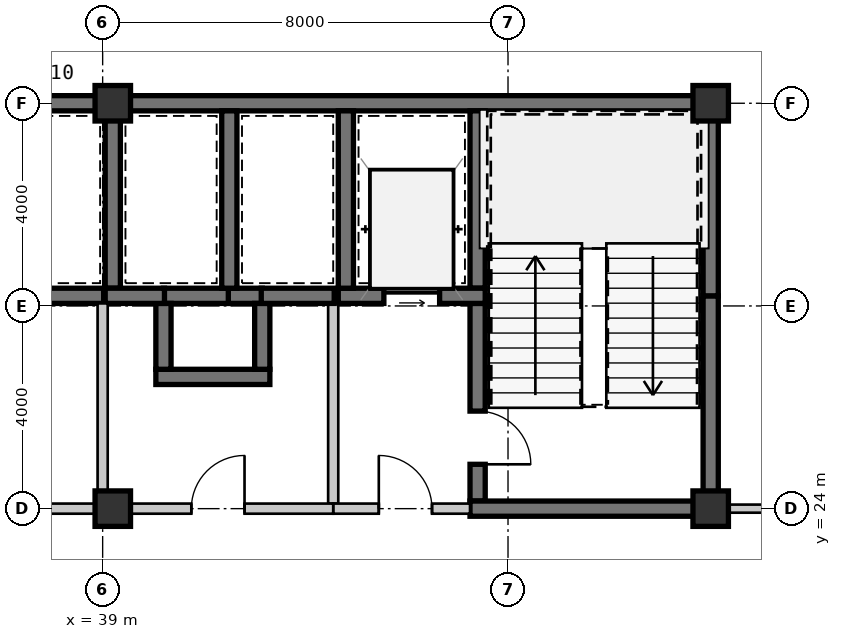
"""IFC4 building model, lengths in metres.
Left out: names, types, materials, properties, quantities, classifications, styles, units other than length and angle.
Written with IfcOpenShell. Run it as: python <this file> out.ifc"""

import sys

from ifc_helpers import new_model, si_unit, direction, frame, frame_2d, origin, origin_2d, place, context, subcontext, project, spatial, rectangle, extrude, source, transform, mapped, element, fill, save


model = new_model("IFC4")
c1 = context("Model", 3, precision=1e-05, world=origin(), true_north=direction((0.0, 1.0)))
c2 = subcontext(c1, "Body", "Model", "MODEL_VIEW")
j1 = project(units=[si_unit("LENGTHUNIT", "METRE"), si_unit("PLANEANGLEUNIT", "RADIAN")], contexts=[c1])
p1 = place(None, origin())
s1 = spatial("IfcSite", under=j1, at=p1, CompositionType="ELEMENT")
p2 = place(p1, origin())
s2 = spatial("IfcBuilding", under=s1, at=p2, CompositionType="ELEMENT")
p3 = place(p2, frame((0.0, 0.0, 93.45)))
s3 = spatial("IfcBuildingStorey", under=s2, at=p3, CompositionType="ELEMENT", Elevation=93.45)
m1 = source(origin(), c2, "Body", "SweptSolid", [
    extrude(rectangle(XDim=0.7, YDim=0.7, at=origin_2d()), origin(), (0.0, 0.0, 1.0), 3.15),
])
for number, where, z_axis, x_axis in (
    (1, (39.2, 24.0, 0.0), (0.0, 0.0, 1.0), (1.0, 0.0, 0.0)),
    (2, (51.0, 24.0, 0.0), (0.0, 0.0, 1.0), (1.0, 0.0, 0.0)),
    (3, (39.2, 32.0, 0.0), (0.0, 0.0, 1.0), (1.0, 0.0, 0.0)),
    (4, (51.0, 32.0, 0.0), (0.0, 0.0, 1.0), (1.0, 0.0, 0.0)),
):
    element("IfcColumn", number, at=place(p3, frame(where, z_axis=z_axis, x_axis=x_axis)), inside=s3, PredefinedType="COLUMN", context=c2, shape_type="MappedRepresentation", body=[
        mapped(m1, transform((0.0, 0.0, 0.0), scale=1.0)),
    ])
m2 = source(origin(), c2, "Body", "SweptSolid", [
    extrude(rectangle(XDim=11.2, YDim=0.3, at=frame_2d((5.6, 0.0))), origin(), (0.0, 0.0, 1.0), 2.93),
])
p4 = place(p3, frame((28.0, 32.0, 0.0), z_axis=(0.0, 0.0, 1.0), x_axis=(1.0, 0.0, 0.0)))
e5 = element("IfcWall", 5, at=p4, inside=s3, PredefinedType="SHEAR", context=c2, shape_type="MappedRepresentation", body=[
    mapped(m2, transform((0.0, 0.0, 0.0), scale=1.0)),
])
m3 = source(origin(), c2, "Body", "SweptSolid", [
    extrude(rectangle(XDim=11.95, YDim=0.3, at=frame_2d((5.975, 0.0))), origin(), (0.0, 0.0, 1.0), 2.93),
])
p5 = place(p3, frame((39.2, 32.0, 0.0), z_axis=(0.0, 0.0, 1.0), x_axis=(1.0, 0.0, 0.0)))
e6 = element("IfcWall", 6, at=p5, inside=s3, PredefinedType="SHEAR", context=c2, shape_type="MappedRepresentation", body=[
    mapped(m3, transform((0.0, 0.0, 0.0), scale=1.0)),
])
m4 = source(origin(), c2, "Body", "SweptSolid", [
    extrude(rectangle(XDim=4.05, YDim=0.3, at=frame_2d((2.025, 0.0))), origin(), (0.0, 0.0, 1.0), 2.93),
])
p6 = place(p3, frame((51.0, 24.15, 0.0), z_axis=(0.0, 0.0, 1.0), x_axis=(0.0, 1.0, 0.0)))
e7 = element("IfcWall", 7, at=p6, inside=s3, PredefinedType="SHEAR", context=c2, shape_type="MappedRepresentation", body=[
    mapped(m4, transform((0.0, 0.0, 0.0), scale=1.0)),
])
m5 = source(origin(), c2, "Body", "SweptSolid", [
    extrude(rectangle(XDim=3.65, YDim=0.3, at=frame_2d((1.825, 0.0))), origin(), (0.0, 0.0, 1.0), 2.93),
])
p7 = place(p3, frame((51.0, 28.2, 0.0), z_axis=(0.0, 0.0, 1.0), x_axis=(0.0, 1.0, 0.0)))
e8 = element("IfcWall", 8, at=p7, inside=s3, PredefinedType="SHEAR", context=c2, shape_type="MappedRepresentation", body=[
    mapped(m5, transform((0.0, 0.0, 0.0), scale=1.0)),
])
m6 = source(origin(), c2, "Body", "SweptSolid", [
    extrude(rectangle(XDim=3.5, YDim=0.3, at=frame_2d((1.75, 0.0))), origin(), (0.0, 0.0, 1.0), 2.93),
])
p8 = place(p3, frame((46.4, 31.85, 0.0), z_axis=(0.0, 0.0, 1.0), x_axis=(0.0, -1.0, 0.0)))
e9 = element("IfcWall", 9, at=p8, inside=s3, PredefinedType="SHEAR", context=c2, shape_type="MappedRepresentation", body=[
    mapped(m6, transform((0.0, 0.0, 0.0), scale=1.0)),
])
m7 = source(origin(), c2, "Body", "SweptSolid", [
    extrude(rectangle(XDim=3.9, YDim=0.3, at=frame_2d((1.95, 0.0))), origin(), (0.0, 0.0, 1.0), 2.93),
])
p9 = place(p3, frame((46.4, 28.05, 0.0), z_axis=(0.0, 0.0, 1.0), x_axis=(0.0, -1.0, 0.0)))
e10 = element("IfcWall", 10, at=p9, inside=s3, PredefinedType="SHEAR", context=c2, shape_type="MappedRepresentation", body=[
    mapped(m7, transform((0.0, 0.0, 0.0), scale=1.0)),
])
m8 = source(origin(), c2, "Body", "SweptSolid", [
    extrude(rectangle(XDim=1.05, YDim=2.1, at=frame_2d((0.525, 1.05))), frame((0.0, 0.16, 0.0), z_axis=(0.0, -1.0, 0.0), x_axis=(1.0, 0.0, 0.0)), (0.0, 0.0, 1.0), 0.32),
])
p10 = place(p9, frame((2.125, 0.0, 0.0)))
e11 = element("IfcOpeningElement", 11, at=p10, cuts=e10, PredefinedType="OPENING", context=c2, shape_type="MappedRepresentation", body=[
    mapped(m8, transform((0.0, 0.0, 0.0), scale=1.0)),
])
m9 = source(origin(), c2, "Body", "SweptSolid", [
    extrude(rectangle(XDim=4.9, YDim=0.3, at=frame_2d((2.45, 0.0))), origin(), (0.0, 0.0, 1.0), 2.93),
])
p11 = place(p3, frame((46.25, 24.0, 0.0), z_axis=(0.0, 0.0, 1.0), x_axis=(1.0, 0.0, 0.0)))
e12 = element("IfcWall", 12, at=p11, inside=s3, PredefinedType="SHEAR", context=c2, shape_type="MappedRepresentation", body=[
    mapped(m9, transform((0.0, 0.0, 0.0), scale=1.0)),
])
m10 = source(origin(), c2, "Body", "SweptSolid", [
    extrude(rectangle(XDim=2.9, YDim=0.3, at=frame_2d((1.45, 0.0))), origin(), (0.0, 0.0, 1.0), 2.93),
])
p12 = place(p3, frame((43.65, 28.2, 0.0), z_axis=(0.0, 0.0, 1.0), x_axis=(1.0, 0.0, 0.0)))
e13 = element("IfcWall", 13, at=p12, inside=s3, PredefinedType="SHEAR", context=c2, shape_type="MappedRepresentation", body=[
    mapped(m10, transform((0.0, 0.0, 0.0), scale=1.0)),
])
m11 = source(origin(), c2, "Body", "SweptSolid", [
    extrude(rectangle(XDim=1.1, YDim=2.15, at=frame_2d((0.55, 1.075))), frame((0.0, 0.16, 0.0), z_axis=(0.0, -1.0, 0.0), x_axis=(1.0, 0.0, 0.0)), (0.0, 0.0, 1.0), 0.32),
])
p13 = place(p12, frame((0.9, 0.0, 0.0)))
e14 = element("IfcOpeningElement", 14, at=p13, cuts=e13, PredefinedType="OPENING", context=c2, shape_type="MappedRepresentation", body=[
    mapped(m11, transform((0.0, 0.0, 0.0), scale=1.0)),
])
p14 = place(p3, frame((43.8, 31.85, 0.0), z_axis=(0.0, 0.0, 1.0), x_axis=(0.0, -1.0, 0.0)))
e15 = element("IfcWall", 15, at=p14, inside=s3, PredefinedType="SHEAR", context=c2, shape_type="MappedRepresentation", body=[
    mapped(m6, transform((0.0, 0.0, 0.0), scale=1.0)),
])
m12 = source(origin(), c2, "Body", "SweptSolid", [
    extrude(rectangle(XDim=3.95, YDim=0.2, at=frame_2d((1.975, 0.0))), origin(), (0.0, 0.0, 1.0), 2.93),
])
p15 = place(p3, frame((43.55, 28.05, 0.0), z_axis=(0.0, 0.0, 1.0), x_axis=(0.0, -1.0, 0.0)))
e16 = element("IfcWall", 16, at=p15, inside=s3, PredefinedType="SOLIDWALL", context=c2, shape_type="MappedRepresentation", body=[
    mapped(m12, transform((0.0, 0.0, 0.0), scale=1.0)),
])
m13 = source(origin(), c2, "Body", "SweptSolid", [
    extrude(rectangle(XDim=2.7, YDim=0.2, at=frame_2d((1.35, 0.0))), origin(), (0.0, 0.0, 1.0), 2.397),
])
p16 = place(p3, frame((43.55, 24.0, 0.0), z_axis=(0.0, 0.0, 1.0), x_axis=(1.0, 0.0, 0.0)))
e17 = element("IfcWall", 17, at=p16, inside=s3, PredefinedType="SOLIDWALL", context=c2, shape_type="MappedRepresentation", body=[
    mapped(m13, transform((0.0, 0.0, 0.0), scale=1.0)),
])
m14 = source(origin(), c2, "Body", "SweptSolid", [
    extrude(rectangle(XDim=1.05, YDim=2.1, at=frame_2d((0.525, 1.05))), frame((0.0, 0.11, 0.0), z_axis=(0.0, -1.0, 0.0), x_axis=(1.0, 0.0, 0.0)), (0.0, 0.0, 1.0), 0.22),
])
p17 = place(p16, frame((0.9, 0.0, 0.0)))
e18 = element("IfcOpeningElement", 18, at=p17, cuts=e17, PredefinedType="OPENING", context=c2, shape_type="MappedRepresentation", body=[
    mapped(m14, transform((0.0, 0.0, 0.0), scale=1.0)),
])
m15 = source(origin(), c2, "Body", "SweptSolid", [
    extrude(rectangle(XDim=1.32, YDim=0.3, at=frame_2d((0.66, 0.0))), origin(), (0.0, 0.0, 1.0), 2.93),
])
p18 = place(p3, frame((41.52, 28.2, 0.0), z_axis=(0.0, 0.0, 1.0), x_axis=(-1.0, 0.0, 0.0)))
e19 = element("IfcWall", 19, at=p18, inside=s3, PredefinedType="SHEAR", context=c2, shape_type="MappedRepresentation", body=[
    mapped(m15, transform((0.0, 0.0, 0.0), scale=1.0)),
])
m16 = source(origin(), c2, "Body", "SweptSolid", [
    extrude(rectangle(XDim=0.67, YDim=0.3, at=frame_2d((0.335, 0.0))), origin(), (0.0, 0.0, 1.0), 2.93),
])
p19 = place(p3, frame((42.15, 28.2, 0.0), z_axis=(0.0, 0.0, 1.0), x_axis=(-1.0, 0.0, 0.0)))
e20 = element("IfcWall", 20, at=p19, inside=s3, PredefinedType="SHEAR", context=c2, shape_type="MappedRepresentation", body=[
    mapped(m16, transform((0.0, 0.0, 0.0), scale=1.0)),
])
m17 = source(origin(), c2, "Body", "SweptSolid", [
    extrude(rectangle(XDim=2.25, YDim=0.3, at=frame_2d((1.125, 0.0))), origin(), (0.0, 0.0, 1.0), 2.93),
])
p20 = place(p3, frame((40.05, 26.6, 0.0), z_axis=(0.0, 0.0, 1.0), x_axis=(1.0, 0.0, 0.0)))
e21 = element("IfcWall", 21, at=p20, inside=s3, PredefinedType="SHEAR", context=c2, shape_type="MappedRepresentation", body=[
    mapped(m17, transform((0.0, 0.0, 0.0), scale=1.0)),
])
m18 = source(origin(), c2, "Body", "SweptSolid", [
    extrude(rectangle(XDim=1.3, YDim=0.3, at=frame_2d((0.65, 0.0))), origin(), (0.0, 0.0, 1.0), 2.93),
])
for number, where, z_axis, x_axis in (
    (22, (40.2, 28.05, 0.0), (0.0, 0.0, 1.0), (0.0, -1.0, 0.0)),
    (23, (42.15, 26.75, 0.0), (0.0, 0.0, 1.0), (0.0, 1.0, 0.0)),
):
    element("IfcWall", number, at=place(p3, frame(where, z_axis=z_axis, x_axis=x_axis)), inside=s3, PredefinedType="SHEAR", context=c2, shape_type="MappedRepresentation", body=[
        mapped(m18, transform((0.0, 0.0, 0.0), scale=1.0)),
    ])
p21 = place(p3, frame((39.2, 28.35, 0.0), z_axis=(0.0, 0.0, 1.0), x_axis=(0.0, 1.0, 0.0)))
e24 = element("IfcWall", 24, at=p21, inside=s3, PredefinedType="SHEAR", context=c2, shape_type="MappedRepresentation", body=[
    mapped(m6, transform((0.0, 0.0, 0.0), scale=1.0)),
])
m19 = source(origin(), c2, "Body", "SweptSolid", [
    extrude(rectangle(XDim=2.32, YDim=0.3, at=frame_2d((1.16, 0.0))), origin(), (0.0, 0.0, 1.0), 2.93),
])
p22 = place(p3, frame((36.7, 28.2, 0.0), z_axis=(0.0, 0.0, 1.0), x_axis=(1.0, 0.0, 0.0)))
e25 = element("IfcWall", 25, at=p22, inside=s3, PredefinedType="SHEAR", context=c2, shape_type="MappedRepresentation", body=[
    mapped(m19, transform((0.0, 0.0, 0.0), scale=1.0)),
])
p23 = place(p3, frame((41.5, 28.35, 0.0), z_axis=(0.0, 0.0, 1.0), x_axis=(0.0, 1.0, 0.0)))
e26 = element("IfcWall", 26, at=p23, inside=s3, PredefinedType="SHEAR", context=c2, shape_type="MappedRepresentation", body=[
    mapped(m6, transform((0.0, 0.0, 0.0), scale=1.0)),
])
m20 = source(origin(), c2, "Body", "SweptSolid", [
    extrude(rectangle(XDim=1.17, YDim=0.3, at=frame_2d((0.585, 0.0))), origin(), (0.0, 0.0, 1.0), 2.93),
])
p24 = place(p3, frame((39.05, 28.2, 0.0), z_axis=(0.0, 0.0, 1.0), x_axis=(1.0, 0.0, 0.0)))
e27 = element("IfcWall", 27, at=p24, inside=s3, PredefinedType="SHEAR", context=c2, shape_type="MappedRepresentation", body=[
    mapped(m20, transform((0.0, 0.0, 0.0), scale=1.0)),
])
m21 = source(origin(), c2, "Body", "SweptSolid", [
    extrude(rectangle(XDim=1.44, YDim=0.3, at=frame_2d((0.72, 0.0))), origin(), (0.0, 0.0, 1.0), 2.93),
])
p25 = place(p3, frame((42.13, 28.2, 0.0), z_axis=(0.0, 0.0, 1.0), x_axis=(1.0, 0.0, 0.0)))
e28 = element("IfcWall", 28, at=p25, inside=s3, PredefinedType="SHEAR", context=c2, shape_type="MappedRepresentation", body=[
    mapped(m21, transform((0.0, 0.0, 0.0), scale=1.0)),
])
p26 = place(p3, frame((39.0, 28.05, 0.0), z_axis=(0.0, 0.0, 1.0), x_axis=(0.0, -1.0, 0.0)))
e29 = element("IfcWall", 29, at=p26, inside=s3, PredefinedType="SOLIDWALL", context=c2, shape_type="MappedRepresentation", body=[
    mapped(m12, transform((0.0, 0.0, 0.0), scale=1.0)),
])
m22 = source(origin(), c2, "Body", "SweptSolid", [
    extrude(rectangle(XDim=3.85, YDim=0.2, at=frame_2d((1.925, 0.0))), origin(), (0.0, 0.0, 1.0), 2.47),
])
p27 = place(p3, frame((39.0, 24.0, 0.0), z_axis=(0.0, 0.0, 1.0), x_axis=(-1.0, 0.0, 0.0)))
e30 = element("IfcWall", 30, at=p27, inside=s3, PredefinedType="SOLIDWALL", context=c2, shape_type="MappedRepresentation", body=[
    mapped(m22, transform((0.0, 0.0, 0.0), scale=1.0)),
])
p28 = place(p27, frame((1.4, 0.0, 0.0)))
e31 = element("IfcOpeningElement", 31, at=p28, cuts=e30, PredefinedType="OPENING", context=c2, shape_type="MappedRepresentation", body=[
    mapped(m14, transform((0.0, 0.0, 0.0), scale=1.0)),
])
m23 = source(origin(), c2, "Body", "SweptSolid", [
    extrude(rectangle(XDim=4.55, YDim=0.2, at=frame_2d((2.275, 0.0))), origin(), (0.0, 0.0, 1.0), 2.397),
])
p29 = place(p3, frame((43.55, 24.0, 0.0), z_axis=(0.0, 0.0, 1.0), x_axis=(-1.0, 0.0, 0.0)))
e32 = element("IfcWall", 32, at=p29, inside=s3, PredefinedType="SOLIDWALL", context=c2, shape_type="MappedRepresentation", body=[
    mapped(m23, transform((0.0, 0.0, 0.0), scale=1.0)),
])
p30 = place(p29, frame((1.75, 0.0, 0.0)))
e33 = element("IfcOpeningElement", 33, at=p30, cuts=e32, PredefinedType="OPENING", context=c2, shape_type="MappedRepresentation", body=[
    mapped(m14, transform((0.0, 0.0, 0.0), scale=1.0)),
])
m24 = source(origin(), c2, "Body", "SweptSolid", [
    extrude(rectangle(XDim=1.155, YDim=0.16, at=frame_2d((0.577, 0.0))), origin(), (0.0, 0.0, 1.0), 2.328),
])
p31 = place(p3, frame((51.15, 24.0, 0.0), z_axis=(0.0, 0.0, 1.0), x_axis=(1.0, 0.0, 0.0)))
e34 = element("IfcWall", 34, at=p31, inside=s3, PredefinedType="PARTITIONING", context=c2, shape_type="MappedRepresentation", body=[
    mapped(m24, transform((0.0, 0.0, 0.0), scale=1.0)),
])
m25 = source(origin(), c2, "Body", "SweptSolid", [
    extrude(rectangle(XDim=1.05, YDim=2.1, at=frame_2d((0.525, 1.05))), frame((0.0, 0.025, 0.0), z_axis=(0.0, -1.0, 0.0), x_axis=(1.0, 0.0, 0.0)), (0.0, 0.0, 1.0), 0.05),
])
p32 = place(p10, origin())
e35 = element("IfcDoor", 35, at=p32, inside=s3, OperationType="SINGLE_SWING_RIGHT", PredefinedType="DOOR", context=c2, shape_type="MappedRepresentation", body=[
    mapped(m25, transform((0.0, 0.0, 0.0), scale=1.0)),
])
fill(e11, e35)
m26 = source(origin(), c2, "Body", "SweptSolid", [
    extrude(rectangle(XDim=1.1, YDim=2.15, at=frame_2d((0.55, 1.075))), frame((0.0, 0.025, 0.0), z_axis=(0.0, -1.0, 0.0), x_axis=(1.0, 0.0, 0.0)), (0.0, 0.0, 1.0), 0.05),
])
p33 = place(p13, origin())
e36 = element("IfcDoor", 36, at=p33, inside=s3, OperationType="SLIDING_TO_LEFT", PredefinedType="DOOR", context=c2, shape_type="MappedRepresentation", body=[
    mapped(m26, transform((0.0, 0.0, 0.0), scale=1.0)),
])
fill(e14, e36)
p34 = place(p17, origin())
e37 = element("IfcDoor", 37, at=p34, inside=s3, OperationType="SINGLE_SWING_LEFT", PredefinedType="DOOR", context=c2, shape_type="MappedRepresentation", body=[
    mapped(m25, transform((0.0, 0.0, 0.0), scale=1.0)),
])
fill(e18, e37)
p35 = place(p30, frame((1.05, 0.0, 0.0), z_axis=(0.0, 0.0, 1.0), x_axis=(-1.0, 0.0, 0.0)))
e38 = element("IfcDoor", 38, at=p35, inside=s3, OperationType="SINGLE_SWING_RIGHT", PredefinedType="DOOR", context=c2, shape_type="MappedRepresentation", body=[
    mapped(m25, transform((0.0, 0.0, 0.0), scale=1.0)),
])
fill(e33, e38)
save(model, sys.argv[1])
